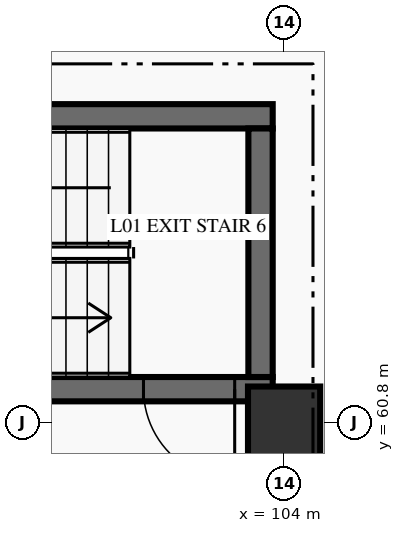
"""IFC4 building model, lengths in metres.
Left out: names, types, materials, properties, quantities, classifications, styles, units other than length and angle.
Written with IfcOpenShell. Run it as: python <this file> out.ifc"""

import sys

from ifc_helpers import new_model, si_unit, direction, frame, frame_2d, origin, origin_2d, place, context, subcontext, project, spatial, rectangle, extrude, element, fill, save


model = new_model("IFC4")
c1 = context("Model", 3, precision=1e-05, world=origin(), true_north=direction((0.0, 1.0)))
c2 = subcontext(c1, "Body", "Model", "MODEL_VIEW")
j1 = project(units=[si_unit("LENGTHUNIT", "METRE"), si_unit("PLANEANGLEUNIT", "RADIAN")], contexts=[c1])
p1 = place(None, origin())
s1 = spatial("IfcSite", under=j1, at=p1, CompositionType="ELEMENT")
p2 = place(p1, origin())
s2 = spatial("IfcBuilding", under=s1, at=p2, CompositionType="ELEMENT")
p3 = place(p2, origin())
s3 = spatial("IfcBuildingStorey", under=s2, at=p3, CompositionType="ELEMENT", Elevation=0.0)
p4 = place(p3, frame((104.0, 60.8, 0.0), z_axis=(0.0, 0.0, 1.0), x_axis=(1.0, 0.0, 0.0)))
e1 = element("IfcColumn", 1, at=p4, inside=s3, PredefinedType="COLUMN", context=c2, shape_type="SweptSolid", body=[
    extrude(rectangle(XDim=0.95, YDim=0.95, at=origin_2d()), origin(), (0.0, 0.0, 1.0), 5.4),
])
p5 = place(p3, frame((103.85, 61.24, 0.0), z_axis=(0.0, 0.0, 1.0), x_axis=(-1.0, 0.0, 0.0)))
e2 = element("IfcWall", 2, at=p5, inside=s3, PredefinedType="SHEAR", context=c2, shape_type="SweptSolid", body=[
    extrude(rectangle(XDim=7.7, YDim=0.32, at=frame_2d((3.85, 0.0))), origin(), (0.0, 0.0, 1.0), 5.4),
])
p6 = place(p5, frame((0.5, 0.0, 0.0)))
e3 = element("IfcOpeningElement", 3, at=p6, cuts=e2, PredefinedType="OPENING", context=c2, shape_type="SweptSolid", body=[
    extrude(rectangle(XDim=1.2, YDim=2.2, at=frame_2d((0.6, 1.1))), frame((0.0, 0.17, 0.0), z_axis=(0.0, -1.0, 0.0), x_axis=(1.0, 0.0, 0.0)), (0.0, 0.0, 1.0), 0.34),
])
p7 = place(p3, frame((96.15, 64.83, 0.0), z_axis=(0.0, 0.0, 1.0), x_axis=(1.0, 0.0, 0.0)))
e4 = element("IfcWall", 4, at=p7, inside=s3, PredefinedType="SHEAR", context=c2, shape_type="SweptSolid", body=[
    extrude(rectangle(XDim=7.7, YDim=0.32, at=frame_2d((3.85, 0.0))), origin(), (0.0, 0.0, 1.0), 5.4),
])
p8 = place(p3, frame((103.69, 64.67, 0.0), z_axis=(0.0, 0.0, 1.0), x_axis=(0.0, -1.0, 0.0)))
e5 = element("IfcWall", 5, at=p8, inside=s3, PredefinedType="SHEAR", context=c2, shape_type="SweptSolid", body=[
    extrude(rectangle(XDim=3.27, YDim=0.32, at=frame_2d((1.635, 0.0))), origin(), (0.0, 0.0, 1.0), 5.4),
])
p9 = place(p6, origin())
e6 = element("IfcDoor", 6, at=p9, inside=s3, OperationType="SINGLE_SWING_LEFT", PredefinedType="DOOR", context=c2, shape_type="SweptSolid", body=[
    extrude(rectangle(XDim=1.2, YDim=2.2, at=frame_2d((0.6, 1.1))), frame((0.0, 0.025, 0.0), z_axis=(0.0, -1.0, 0.0), x_axis=(1.0, 0.0, 0.0)), (0.0, 0.0, 1.0), 0.05),
])
fill(e3, e6)
save(model, sys.argv[1])
